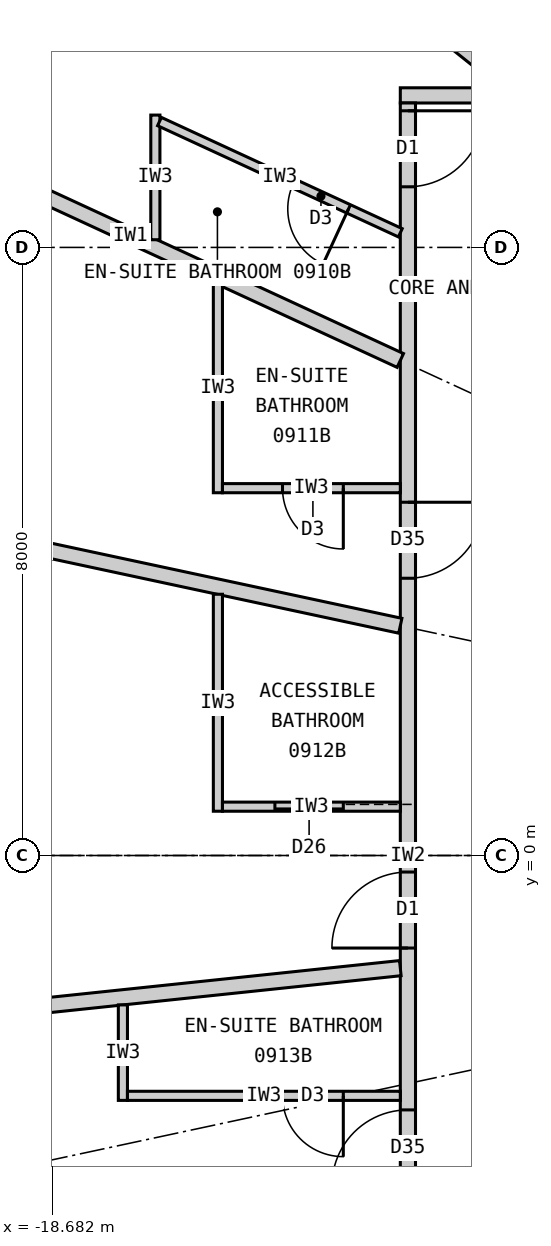
"""IFC4 building model, lengths in metres.
Left out: names, types, materials, properties, quantities, classifications, styles, units other than length and angle.
Written with IfcOpenShell. Run it as: python <this file> out.ifc"""

import sys

from ifc_helpers import new_model, si_unit, direction, frame, frame_2d, origin, place, context, subcontext, project, spatial, rectangle, extrude, element, fill, save


model = new_model("IFC4")
c1 = context("Model", 3, precision=1e-05, world=origin(), true_north=direction((0.0, 1.0)))
c2 = subcontext(c1, "Body", "Model", "MODEL_VIEW")
j1 = project(units=[si_unit("LENGTHUNIT", "METRE"), si_unit("PLANEANGLEUNIT", "RADIAN")], contexts=[c1])
p1 = place(None, origin())
s1 = spatial("IfcSite", under=j1, at=p1, CompositionType="ELEMENT")
p2 = place(p1, origin())
s2 = spatial("IfcBuilding", under=s1, at=p2, CompositionType="ELEMENT")
p3 = place(p2, frame((0.0, 0.0, 42.6)))
s3 = spatial("IfcBuildingStorey", under=s2, at=p3, CompositionType="ELEMENT", Elevation=42.6)
p4 = place(p3, frame((-14.1, 10.0, 0.0), z_axis=(0.0, 0.0, 1.0), x_axis=(1.0, 0.0, 0.0)))
e1 = element("IfcWall", 1, at=p4, inside=s3, PredefinedType="PARTITIONING", context=c2, shape_type="SweptSolid", body=[
    extrude(rectangle(XDim=28.2, YDim=0.2, at=frame_2d((14.1, 0.0))), origin(), (0.0, 0.0, 1.0), 3.05),
])
p5 = place(p4, frame((23.477, 0.0, 0.0)))
e2 = element("IfcOpeningElement", 2, at=p5, cuts=e1, PredefinedType="OPENING", context=c2, shape_type="SweptSolid", body=[
    extrude(rectangle(XDim=1.0, YDim=2.2, at=frame_2d((0.5, 1.1))), frame((0.0, 0.11, 0.0), z_axis=(0.0, -1.0, 0.0), x_axis=(1.0, 0.0, 0.0)), (0.0, 0.0, 1.0), 0.22),
])
p6 = place(p4, frame((18.529, 0.0, 0.0)))
e3 = element("IfcOpeningElement", 3, at=p6, cuts=e1, PredefinedType="OPENING", context=c2, shape_type="SweptSolid", body=[
    extrude(rectangle(XDim=1.0, YDim=2.2, at=frame_2d((0.5, 1.1))), frame((0.0, 0.11, 0.0), z_axis=(0.0, -1.0, 0.0), x_axis=(1.0, 0.0, 0.0)), (0.0, 0.0, 1.0), 0.22),
])
p7 = place(p4, frame((14.623, 0.0, 0.0)))
e4 = element("IfcOpeningElement", 4, at=p7, cuts=e1, PredefinedType="OPENING", context=c2, shape_type="SweptSolid", body=[
    extrude(rectangle(XDim=1.0, YDim=2.2, at=frame_2d((0.5, 1.1))), frame((0.0, 0.11, 0.0), z_axis=(0.0, -1.0, 0.0), x_axis=(1.0, 0.0, 0.0)), (0.0, 0.0, 1.0), 0.22),
])
p8 = place(p4, frame((11.252, 0.0, 0.0)))
e5 = element("IfcOpeningElement", 5, at=p8, cuts=e1, PredefinedType="OPENING", context=c2, shape_type="SweptSolid", body=[
    extrude(rectangle(XDim=1.0, YDim=2.1, at=frame_2d((0.5, 1.05))), frame((0.0, 0.11, 0.0), z_axis=(0.0, -1.0, 0.0), x_axis=(1.0, 0.0, 0.0)), (0.0, 0.0, 1.0), 0.22),
])
p9 = place(p4, frame((8.671, 0.0, 0.0)))
e6 = element("IfcOpeningElement", 6, at=p9, cuts=e1, PredefinedType="OPENING", context=c2, shape_type="SweptSolid", body=[
    extrude(rectangle(XDim=1.0, YDim=2.2, at=frame_2d((0.5, 1.1))), frame((0.0, 0.11, 0.0), z_axis=(0.0, -1.0, 0.0), x_axis=(1.0, 0.0, 0.0)), (0.0, 0.0, 1.0), 0.22),
])
p10 = place(p4, frame((1.616, 0.0, 0.0)))
e7 = element("IfcOpeningElement", 7, at=p10, cuts=e1, PredefinedType="OPENING", context=c2, shape_type="SweptSolid", body=[
    extrude(rectangle(XDim=1.0, YDim=2.2, at=frame_2d((0.5, 1.1))), frame((0.0, 0.11, 0.0), z_axis=(0.0, -1.0, 0.0), x_axis=(1.0, 0.0, 0.0)), (0.0, 0.0, 1.0), 0.22),
])
p11 = place(p3, frame((-14.0, 9.9, 0.0), z_axis=(0.0, 0.0, 1.0), x_axis=(0.0, -1.0, 0.0)))
e8 = element("IfcWall", 8, at=p11, inside=s3, PredefinedType="PARTITIONING", context=c2, shape_type="SweptSolid", body=[
    extrude(rectangle(XDim=19.8, YDim=0.2, at=frame_2d((9.9, 0.0))), origin(), (0.0, 0.0, 1.0), 3.05),
])
p12 = place(p11, frame((0.103, 0.0, 0.0)))
e9 = element("IfcOpeningElement", 9, at=p12, cuts=e8, PredefinedType="OPENING", context=c2, shape_type="SweptSolid", body=[
    extrude(rectangle(XDim=1.0, YDim=2.2, at=frame_2d((0.5, 1.1))), frame((0.0, 0.11, 0.0), z_axis=(0.0, -1.0, 0.0), x_axis=(1.0, 0.0, 0.0)), (0.0, 0.0, 1.0), 0.22),
])
p13 = place(p11, frame((5.252, 0.0, 0.0)))
e10 = element("IfcOpeningElement", 10, at=p13, cuts=e8, PredefinedType="OPENING", context=c2, shape_type="SweptSolid", body=[
    extrude(rectangle(XDim=1.0, YDim=2.0, at=frame_2d((0.5, 1.0))), frame((0.0, 0.11, 0.0), z_axis=(0.0, -1.0, 0.0), x_axis=(1.0, 0.0, 0.0)), (0.0, 0.0, 1.0), 0.22),
])
p14 = place(p11, frame((10.117, 0.0, 0.0)))
e11 = element("IfcOpeningElement", 11, at=p14, cuts=e8, PredefinedType="OPENING", context=c2, shape_type="SweptSolid", body=[
    extrude(rectangle(XDim=1.0, YDim=2.2, at=frame_2d((0.5, 1.1))), frame((0.0, 0.11, 0.0), z_axis=(0.0, -1.0, 0.0), x_axis=(1.0, 0.0, 0.0)), (0.0, 0.0, 1.0), 0.22),
])
p15 = place(p11, frame((13.247, 0.0, 0.0)))
e12 = element("IfcOpeningElement", 12, at=p15, cuts=e8, PredefinedType="OPENING", context=c2, shape_type="SweptSolid", body=[
    extrude(rectangle(XDim=1.0, YDim=2.0, at=frame_2d((0.5, 1.0))), frame((0.0, 0.11, 0.0), z_axis=(0.0, -1.0, 0.0), x_axis=(1.0, 0.0, 0.0)), (0.0, 0.0, 1.0), 0.22),
])
p16 = place(p11, frame((15.679, 0.0, 0.0)))
e13 = element("IfcOpeningElement", 13, at=p16, cuts=e8, PredefinedType="OPENING", context=c2, shape_type="SweptSolid", body=[
    extrude(rectangle(XDim=1.0, YDim=2.2, at=frame_2d((0.5, 1.1))), frame((0.0, 0.11, 0.0), z_axis=(0.0, -1.0, 0.0), x_axis=(1.0, 0.0, 0.0)), (0.0, 0.0, 1.0), 0.22),
])
p17 = place(p3, frame((-12.625, 10.1, 0.0), z_axis=(0.0, 0.0, 1.0), x_axis=(-0.780872884676, 0.624689953479, 0.0)))
e14 = element("IfcWall", 14, at=p17, inside=s3, PredefinedType="PARTITIONING", context=c2, shape_type="SweptSolid", body=[
    extrude(rectangle(XDim=5.845, YDim=0.2, at=frame_2d((2.922, 0.0))), origin(), (0.0, 0.0, 1.0), 2.15),
])
p18 = place(p3, frame((-14.1, 6.512, 0.0), z_axis=(0.0, 0.0, 1.0), x_axis=(-0.907842433118, 0.41931147925, 0.0)))
e15 = element("IfcWall", 15, at=p18, inside=s3, PredefinedType="PARTITIONING", context=c2, shape_type="SweptSolid", body=[
    extrude(rectangle(XDim=7.823, YDim=0.2, at=frame_2d((3.912, 0.0))), origin(), (0.0, 0.0, 1.0), 2.15),
])
p19 = place(p3, frame((-14.1, 3.022, 0.0), z_axis=(0.0, 0.0, 1.0), x_axis=(-0.977786510688, 0.209603290805, 0.0)))
e16 = element("IfcWall", 16, at=p19, inside=s3, PredefinedType="PARTITIONING", context=c2, shape_type="SweptSolid", body=[
    extrude(rectangle(XDim=9.887, YDim=0.2, at=frame_2d((4.943, 0.0))), origin(), (0.0, 0.0, 1.0), 2.05),
])
p20 = place(p3, frame((-14.1, -1.482, 0.0), z_axis=(0.0, 0.0, 1.0), x_axis=(-0.994522076235, -0.104526742422, 0.0)))
e17 = element("IfcWall", 17, at=p20, inside=s3, PredefinedType="PARTITIONING", context=c2, shape_type="SweptSolid", body=[
    extrude(rectangle(XDim=11.821, YDim=0.2, at=frame_2d((5.91, 0.0))), origin(), (0.0, 0.0, 1.0), 2.2),
])
p21 = place(p3, frame((-17.323, 8.101, 0.0), z_axis=(0.0, 0.0, 1.0), x_axis=(0.0, 1.0, 0.0)))
e18 = element("IfcWall", 18, at=p21, inside=s3, PredefinedType="PARTITIONING", context=c2, shape_type="SweptSolid", body=[
    extrude(rectangle(XDim=1.64, YDim=0.12, at=frame_2d((0.82, 0.0))), origin(), (0.0, 0.0, 1.0), 3.05),
])
p22 = place(p3, frame((-14.1, 8.193, 0.0), z_axis=(0.0, 0.0, 1.0), x_axis=(-0.907836493557, 0.419324338628, 0.0)))
e19 = element("IfcWall", 19, at=p22, inside=s3, PredefinedType="PARTITIONING", context=c2, shape_type="SweptSolid", body=[
    extrude(rectangle(XDim=3.49, YDim=0.12, at=frame_2d((1.745, 0.0))), origin(), (0.0, 0.0, 1.0), 3.05),
])
p23 = place(p22, frame((0.75, 0.0, 0.0)))
e20 = element("IfcOpeningElement", 20, at=p23, cuts=e19, PredefinedType="OPENING", context=c2, shape_type="SweptSolid", body=[
    extrude(rectangle(XDim=0.8, YDim=2.1, at=frame_2d((0.4, 1.05))), frame((0.0, 0.07, 0.0), z_axis=(0.0, -1.0, 0.0), x_axis=(1.0, 0.0, 0.0)), (0.0, 0.0, 1.0), 0.14),
])
p24 = place(p3, frame((-16.5, 7.521, 0.0), z_axis=(0.0, 0.0, 1.0), x_axis=(0.0, -1.0, 0.0)))
e21 = element("IfcWall", 21, at=p24, inside=s3, PredefinedType="PARTITIONING", context=c2, shape_type="SweptSolid", body=[
    extrude(rectangle(XDim=2.749, YDim=0.12, at=frame_2d((1.374, 0.0))), origin(), (0.0, 0.0, 1.0), 3.05),
])
p25 = place(p3, frame((-14.1, 4.833, 0.0), z_axis=(0.0, 0.0, 1.0), x_axis=(-1.0, 0.0, 0.0)))
e22 = element("IfcWall", 22, at=p25, inside=s3, PredefinedType="PARTITIONING", context=c2, shape_type="SweptSolid", body=[
    extrude(rectangle(XDim=2.34, YDim=0.12, at=frame_2d((1.17, 0.0))), origin(), (0.0, 0.0, 1.0), 3.05),
])
p26 = place(p25, frame((0.75, 0.0, 0.0)))
e23 = element("IfcOpeningElement", 23, at=p26, cuts=e22, PredefinedType="OPENING", context=c2, shape_type="SweptSolid", body=[
    extrude(rectangle(XDim=0.8, YDim=2.1, at=frame_2d((0.4, 1.05))), frame((0.0, 0.07, 0.0), z_axis=(0.0, -1.0, 0.0), x_axis=(1.0, 0.0, 0.0)), (0.0, 0.0, 1.0), 0.14),
])
p27 = place(p3, frame((-16.5, 3.437, 0.0), z_axis=(0.0, 0.0, 1.0), x_axis=(0.0, -1.0, 0.0)))
e24 = element("IfcWall", 24, at=p27, inside=s3, PredefinedType="PARTITIONING", context=c2, shape_type="SweptSolid", body=[
    extrude(rectangle(XDim=2.854, YDim=0.12, at=frame_2d((1.427, 0.0))), origin(), (0.0, 0.0, 1.0), 3.05),
])
p28 = place(p3, frame((-14.1, 0.643, 0.0), z_axis=(0.0, 0.0, 1.0), x_axis=(-1.0, 0.0, 0.0)))
e25 = element("IfcWall", 25, at=p28, inside=s3, PredefinedType="PARTITIONING", context=c2, shape_type="SweptSolid", body=[
    extrude(rectangle(XDim=2.34, YDim=0.12, at=frame_2d((1.17, 0.0))), origin(), (0.0, 0.0, 1.0), 3.05),
])
p29 = place(p28, frame((0.75, 0.0, 0.0)))
e26 = element("IfcOpeningElement", 26, at=p29, cuts=e25, PredefinedType="OPENING", context=c2, shape_type="SweptSolid", body=[
    extrude(rectangle(XDim=0.9, YDim=2.1, at=frame_2d((0.45, 1.05))), frame((0.0, 0.07, 0.0), z_axis=(0.0, -1.0, 0.0), x_axis=(1.0, 0.0, 0.0)), (0.0, 0.0, 1.0), 0.14),
])
p30 = place(p3, frame((-17.75, -1.966, 0.0), z_axis=(0.0, 0.0, 1.0), x_axis=(0.0, -1.0, 0.0)))
e27 = element("IfcWall", 27, at=p30, inside=s3, PredefinedType="PARTITIONING", context=c2, shape_type="SweptSolid", body=[
    extrude(rectangle(XDim=1.256, YDim=0.12, at=frame_2d((0.628, 0.0))), origin(), (0.0, 0.0, 1.0), 3.05),
])
p31 = place(p3, frame((-14.1, -3.162, 0.0), z_axis=(0.0, 0.0, 1.0), x_axis=(-1.0, 0.0, 0.0)))
e28 = element("IfcWall", 28, at=p31, inside=s3, PredefinedType="PARTITIONING", context=c2, shape_type="SweptSolid", body=[
    extrude(rectangle(XDim=3.59, YDim=0.12, at=frame_2d((1.795, 0.0))), origin(), (0.0, 0.0, 1.0), 3.05),
])
p32 = place(p31, frame((0.75, 0.0, 0.0)))
e29 = element("IfcOpeningElement", 29, at=p32, cuts=e28, PredefinedType="OPENING", context=c2, shape_type="SweptSolid", body=[
    extrude(rectangle(XDim=0.8, YDim=2.1, at=frame_2d((0.4, 1.05))), frame((0.0, 0.07, 0.0), z_axis=(0.0, -1.0, 0.0), x_axis=(1.0, 0.0, 0.0)), (0.0, 0.0, 1.0), 0.14),
])
p33 = place(p23, origin())
e30 = element("IfcDoor", 30, at=p33, inside=s3, OperationType="SINGLE_SWING_LEFT", PredefinedType="DOOR", context=c2, shape_type="SweptSolid", body=[
    extrude(rectangle(XDim=0.8, YDim=2.1, at=frame_2d((0.4, 1.05))), frame((0.0, 0.025, 0.0), z_axis=(0.0, -1.0, 0.0), x_axis=(1.0, 0.0, 0.0)), (0.0, 0.0, 1.0), 0.05),
])
fill(e20, e30)
p34 = place(p12, origin())
e31 = element("IfcDoor", 31, at=p34, inside=s3, OperationType="SINGLE_SWING_LEFT", PredefinedType="DOOR", context=c2, shape_type="SweptSolid", body=[
    extrude(rectangle(XDim=1.0, YDim=2.2, at=frame_2d((0.5, 1.1))), frame((0.0, 0.025, 0.0), z_axis=(0.0, -1.0, 0.0), x_axis=(1.0, 0.0, 0.0)), (0.0, 0.0, 1.0), 0.05),
])
fill(e9, e31)
p35 = place(p26, origin())
e32 = element("IfcDoor", 32, at=p35, inside=s3, OperationType="SINGLE_SWING_LEFT", PredefinedType="DOOR", context=c2, shape_type="SweptSolid", body=[
    extrude(rectangle(XDim=0.8, YDim=2.1, at=frame_2d((0.4, 1.05))), frame((0.0, 0.025, 0.0), z_axis=(0.0, -1.0, 0.0), x_axis=(1.0, 0.0, 0.0)), (0.0, 0.0, 1.0), 0.05),
])
fill(e23, e32)
p36 = place(p13, origin())
e33 = element("IfcDoor", 33, at=p36, inside=s3, OperationType="SINGLE_SWING_LEFT", PredefinedType="DOOR", context=c2, shape_type="SweptSolid", body=[
    extrude(rectangle(XDim=1.0, YDim=2.0, at=frame_2d((0.5, 1.0))), frame((0.0, 0.025, 0.0), z_axis=(0.0, -1.0, 0.0), x_axis=(1.0, 0.0, 0.0)), (0.0, 0.0, 1.0), 0.05),
])
fill(e10, e33)
p37 = place(p29, origin())
e34 = element("IfcDoor", 34, at=p37, inside=s3, OperationType="SLIDING_TO_LEFT", PredefinedType="DOOR", context=c2, shape_type="SweptSolid", body=[
    extrude(rectangle(XDim=0.9, YDim=2.1, at=frame_2d((0.45, 1.05))), frame((0.0, 0.025, 0.0), z_axis=(0.0, -1.0, 0.0), x_axis=(1.0, 0.0, 0.0)), (0.0, 0.0, 1.0), 0.05),
])
fill(e26, e34)
p38 = place(p14, origin())
e35 = element("IfcDoor", 35, at=p38, inside=s3, OperationType="SINGLE_SWING_RIGHT", PredefinedType="DOOR", context=c2, shape_type="SweptSolid", body=[
    extrude(rectangle(XDim=1.0, YDim=2.2, at=frame_2d((0.5, 1.1))), frame((0.0, 0.025, 0.0), z_axis=(0.0, -1.0, 0.0), x_axis=(1.0, 0.0, 0.0)), (0.0, 0.0, 1.0), 0.05),
])
fill(e11, e35)
p39 = place(p32, origin())
e36 = element("IfcDoor", 36, at=p39, inside=s3, OperationType="SINGLE_SWING_LEFT", PredefinedType="DOOR", context=c2, shape_type="SweptSolid", body=[
    extrude(rectangle(XDim=0.8, YDim=2.1, at=frame_2d((0.4, 1.05))), frame((0.0, 0.025, 0.0), z_axis=(0.0, -1.0, 0.0), x_axis=(1.0, 0.0, 0.0)), (0.0, 0.0, 1.0), 0.05),
])
fill(e29, e36)
p40 = place(p15, origin())
e37 = element("IfcDoor", 37, at=p40, inside=s3, OperationType="SINGLE_SWING_RIGHT", PredefinedType="DOOR", context=c2, shape_type="SweptSolid", body=[
    extrude(rectangle(XDim=1.0, YDim=2.0, at=frame_2d((0.5, 1.0))), frame((0.0, 0.025, 0.0), z_axis=(0.0, -1.0, 0.0), x_axis=(1.0, 0.0, 0.0)), (0.0, 0.0, 1.0), 0.05),
])
fill(e12, e37)
save(model, sys.argv[1])
